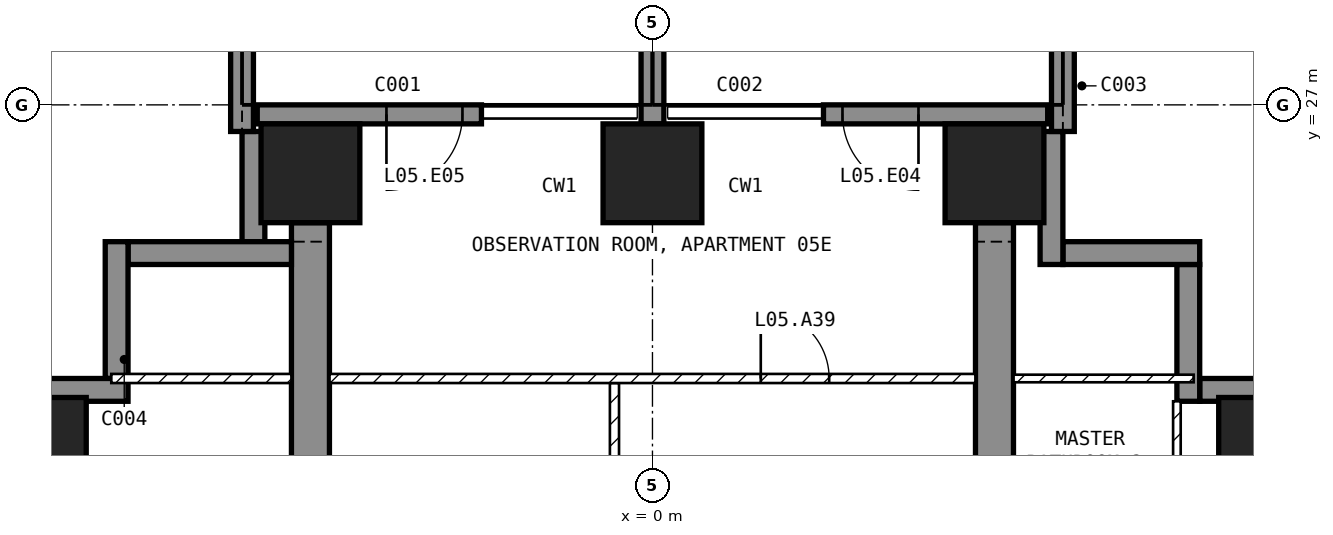
"""IFC4 building model, lengths in metres.
Left out: names, types, materials, properties, quantities, classifications, styles, units other than length and angle.
Written with IfcOpenShell. Run it as: python <this file> out.ifc"""

import sys

from ifc_helpers import new_model, si_unit, direction, frame, frame_2d, origin, origin_2d, place, context, subcontext, project, spatial, polyline, rectangle, outline, extrude, element, fill, save


model = new_model("IFC4")
c1 = context("Model", 3, precision=1e-05, world=origin(), true_north=direction((0.0, 1.0)))
c2 = subcontext(c1, "Body", "Model", "MODEL_VIEW")
j1 = project(units=[si_unit("LENGTHUNIT", "METRE"), si_unit("PLANEANGLEUNIT", "RADIAN")], contexts=[c1])
p1 = place(None, origin())
s1 = spatial("IfcSite", under=j1, at=p1, CompositionType="ELEMENT")
p2 = place(p1, origin())
s2 = spatial("IfcBuilding", under=s1, at=p2, CompositionType="ELEMENT")
p3 = place(p2, frame((0.0, 0.0, 36.5)))
s3 = spatial("IfcBuildingStorey", under=s2, at=p3, CompositionType="ELEMENT", Elevation=36.5)
for number, where, z_axis, x_axis in (
    (1, (-8.1, 22.5, -0.25), (0.0, 0.0, 1.0), (1.0, 0.0, 0.0)),
    (2, (-4.5, 26.1, -0.25), (0.0, 0.0, 1.0), (1.0, 0.0, 0.0)),
    (3, (0.0, 26.1, -0.25), (0.0, 0.0, 1.0), (1.0, 0.0, 0.0)),
    (4, (4.5, 26.1, -0.25), (0.0, 0.0, 1.0), (1.0, 0.0, 0.0)),
    (5, (8.1, 22.5, -0.25), (0.0, 0.0, 1.0), (1.0, 0.0, 0.0)),
):
    element("IfcColumn", number, at=place(p3, frame(where, z_axis=z_axis, x_axis=x_axis)), inside=s3, PredefinedType="COLUMN", context=c2, shape_type="SweptSolid", body=[
        extrude(rectangle(XDim=1.3, YDim=1.3, at=origin_2d()), origin(), (0.0, 0.0, 1.0), 3.5),
    ])
for number, where, z_axis, x_axis in (
    (6, (-4.75, 9.0, -0.25), (1.0, 0.0, 0.0), (0.0, 1.0, 0.0)),
    (7, (4.25, 9.0, -0.25), (1.0, 0.0, 0.0), (0.0, 1.0, 0.0)),
):
    element("IfcWall", number, at=place(p3, frame(where, z_axis=z_axis, x_axis=x_axis)), inside=s3, PredefinedType="SHEAR", context=c2, shape_type="SweptSolid", body=[
        extrude(outline(polyline([(0.0, 0.0), (2.1, 0.0), (2.1, 2.65), (4.5, 2.65), (4.5, 0.0), (9.9, 0.0), (9.9, 2.65), (12.3, 2.65), (12.3, 0.0), (16.45, 0.0), (16.45, 3.5), (0.0, 3.5), (0.0, 0.0)])), origin(), (0.0, 0.0, 1.0), 0.5),
    ])
p4 = place(p3, frame((5.2, 26.875, 0.0), z_axis=(0.0, 0.0, 1.0), x_axis=(-1.0, 0.0, 0.0)))
e8 = element("IfcWall", 8, at=p4, inside=s3, PredefinedType="SOLIDWALL", context=c2, shape_type="SweptSolid", body=[
    extrude(rectangle(XDim=2.95, YDim=0.25, at=frame_2d((1.475, 0.0))), origin(), (0.0, 0.0, 1.0), 3.25),
])
p5 = place(p4, frame((1.7, 0.0, 0.0)))
e9 = element("IfcOpeningElement", 9, at=p5, cuts=e8, PredefinedType="OPENING", context=c2, shape_type="SweptSolid", body=[
    extrude(rectangle(XDim=1.0, YDim=2.4, at=frame_2d((0.5, 1.2))), frame((0.0, 0.135, 0.0), z_axis=(0.0, -1.0, 0.0), x_axis=(1.0, 0.0, 0.0)), (0.0, 0.0, 1.0), 0.27),
])
p6 = place(p3, frame((-2.25, 26.875, 0.0), z_axis=(0.0, 0.0, 1.0), x_axis=(-1.0, 0.0, 0.0)))
e10 = element("IfcWall", 10, at=p6, inside=s3, PredefinedType="SOLIDWALL", context=c2, shape_type="SweptSolid", body=[
    extrude(rectangle(XDim=2.95, YDim=0.25, at=frame_2d((1.475, 0.0))), origin(), (0.0, 0.0, 1.0), 3.25),
])
p7 = place(p6, frame((0.25, 0.0, 0.0)))
e11 = element("IfcOpeningElement", 11, at=p7, cuts=e10, PredefinedType="OPENING", context=c2, shape_type="SweptSolid", body=[
    extrude(rectangle(XDim=1.0, YDim=2.4, at=frame_2d((0.5, 1.2))), frame((0.0, 0.135, 0.0), z_axis=(0.0, -1.0, 0.0), x_axis=(1.0, 0.0, 0.0)), (0.0, 0.0, 1.0), 0.27),
])
p8 = place(p3, frame((8.65, 23.25, 0.0), z_axis=(0.0, 0.0, 1.0), x_axis=(-1.0, 0.0, 0.0)))
e12 = element("IfcWall", 12, at=p8, inside=s3, PredefinedType="SOLIDWALL", context=c2, shape_type="SweptSolid", body=[
    extrude(rectangle(XDim=1.45, YDim=0.3, at=frame_2d((0.725, 0.0))), origin(), (0.0, 0.0, 1.0), 3.25),
])
p9 = place(p3, frame((7.05, 23.1, 0.0), z_axis=(0.0, 0.0, 1.0), x_axis=(0.0, 1.0, 0.0)))
e13 = element("IfcWall", 13, at=p9, inside=s3, PredefinedType="SOLIDWALL", context=c2, shape_type="SweptSolid", body=[
    extrude(rectangle(XDim=1.8, YDim=0.3, at=frame_2d((0.9, 0.0))), origin(), (0.0, 0.0, 1.0), 3.25),
])
p10 = place(p3, frame((7.2, 25.05, 0.0), z_axis=(0.0, 0.0, 1.0), x_axis=(-1.0, 0.0, 0.0)))
e14 = element("IfcWall", 14, at=p10, inside=s3, PredefinedType="SOLIDWALL", context=c2, shape_type="SweptSolid", body=[
    extrude(rectangle(XDim=1.8, YDim=0.3, at=frame_2d((0.9, 0.0))), origin(), (0.0, 0.0, 1.0), 3.25),
])
p11 = place(p3, frame((5.25, 24.9, 0.0), z_axis=(0.0, 0.0, 1.0), x_axis=(0.0, 1.0, 0.0)))
e15 = element("IfcWall", 15, at=p11, inside=s3, PredefinedType="SOLIDWALL", context=c2, shape_type="SweptSolid", body=[
    extrude(rectangle(XDim=1.75, YDim=0.3, at=frame_2d((0.875, 0.0))), origin(), (0.0, 0.0, 1.0), 3.25),
])
p12 = place(p3, frame((-5.25, 26.65, 0.0), z_axis=(0.0, 0.0, 1.0), x_axis=(0.0, -1.0, 0.0)))
e16 = element("IfcWall", 16, at=p12, inside=s3, PredefinedType="SOLIDWALL", context=c2, shape_type="SweptSolid", body=[
    extrude(rectangle(XDim=1.45, YDim=0.3, at=frame_2d((0.725, 0.0))), origin(), (0.0, 0.0, 1.0), 3.25),
])
p13 = place(p3, frame((-4.75, 25.05, 0.0), z_axis=(0.0, 0.0, 1.0), x_axis=(-1.0, 0.0, 0.0)))
e17 = element("IfcWall", 17, at=p13, inside=s3, PredefinedType="SOLIDWALL", context=c2, shape_type="SweptSolid", body=[
    extrude(rectangle(XDim=2.15, YDim=0.3, at=frame_2d((1.075, 0.0))), origin(), (0.0, 0.0, 1.0), 3.25),
])
p14 = place(p3, frame((-7.05, 25.2, 0.0), z_axis=(0.0, 0.0, 1.0), x_axis=(0.0, -1.0, 0.0)))
e18 = element("IfcWall", 18, at=p14, inside=s3, PredefinedType="SOLIDWALL", context=c2, shape_type="SweptSolid", body=[
    extrude(rectangle(XDim=1.8, YDim=0.3, at=frame_2d((0.9, 0.0))), origin(), (0.0, 0.0, 1.0), 3.25),
])
p15 = place(p3, frame((-6.9, 23.25, 0.0), z_axis=(0.0, 0.0, 1.0), x_axis=(-1.0, 0.0, 0.0)))
e19 = element("IfcWall", 19, at=p15, inside=s3, PredefinedType="SOLIDWALL", context=c2, shape_type="SweptSolid", body=[
    extrude(rectangle(XDim=1.75, YDim=0.3, at=frame_2d((0.875, 0.0))), origin(), (0.0, 0.0, 1.0), 3.25),
])
p16 = place(p3, frame((-5.4, 26.65, 0.0), z_axis=(0.0, 0.0, 1.0), x_axis=(0.0, 1.0, 0.0)))
e20 = element("IfcWall", 20, at=p16, inside=s3, PredefinedType="SOLIDWALL", context=c2, shape_type="SweptSolid", body=[
    extrude(rectangle(XDim=3.05, YDim=0.3, at=frame_2d((1.525, 0.0))), origin(), (0.0, 0.0, 1.0), 3.25),
])
p17 = place(p3, frame((0.0, 26.75, 0.0), z_axis=(0.0, 0.0, 1.0), x_axis=(0.0, 1.0, 0.0)))
e21 = element("IfcWall", 21, at=p17, inside=s3, PredefinedType="SOLIDWALL", context=c2, shape_type="SweptSolid", body=[
    extrude(rectangle(XDim=2.95, YDim=0.3, at=frame_2d((1.475, 0.0))), origin(), (0.0, 0.0, 1.0), 3.25),
])
p18 = place(p3, frame((5.4, 26.65, 0.0), z_axis=(0.0, 0.0, 1.0), x_axis=(0.0, 1.0, 0.0)))
e22 = element("IfcWall", 22, at=p18, inside=s3, PredefinedType="SOLIDWALL", context=c2, shape_type="SweptSolid", body=[
    extrude(rectangle(XDim=3.05, YDim=0.3, at=frame_2d((1.525, 0.0))), origin(), (0.0, 0.0, 1.0), 3.25),
])
p19 = place(p3, frame((-0.5, 18.96, 0.0), z_axis=(0.0, 0.0, 1.0), x_axis=(0.0, 1.0, 0.0)))
e23 = element("IfcWall", 23, at=p19, inside=s3, PredefinedType="PARTITIONING", context=c2, shape_type="SweptSolid", body=[
    extrude(rectangle(XDim=4.38, YDim=0.12, at=frame_2d((2.19, 0.0))), origin(), (0.0, 0.0, 1.0), 3.25),
])
p20 = place(p19, frame((1.74, 0.0, 0.0)))
e24 = element("IfcOpeningElement", 24, at=p20, cuts=e23, PredefinedType="OPENING", context=c2, shape_type="SweptSolid", body=[
    extrude(rectangle(XDim=0.9, YDim=2.1, at=frame_2d((0.45, 1.05))), frame((0.0, 0.07, 0.0), z_axis=(0.0, -1.0, 0.0), x_axis=(1.0, 0.0, 0.0)), (0.0, 0.0, 1.0), 0.14),
])
p21 = place(p3, frame((-4.25, 23.4, 0.0), z_axis=(0.0, 0.0, 1.0), x_axis=(1.0, 0.0, 0.0)))
e25 = element("IfcWall", 25, at=p21, inside=s3, PredefinedType="PARTITIONING", context=c2, shape_type="SweptSolid", body=[
    extrude(rectangle(XDim=8.5, YDim=0.12, at=frame_2d((4.25, 0.0))), origin(), (0.0, 0.0, 1.0), 3.25),
])
p22 = place(p21, frame((5.675, 0.0, 0.0)))
e26 = element("IfcOpeningElement", 26, at=p22, cuts=e25, PredefinedType="OPENING", context=c2, shape_type="SweptSolid", body=[
    extrude(rectangle(XDim=0.9, YDim=2.1, at=frame_2d((0.45, 1.05))), frame((0.0, 0.07, 0.0), z_axis=(0.0, -1.0, 0.0), x_axis=(1.0, 0.0, 0.0)), (0.0, 0.0, 1.0), 0.14),
])
p23 = place(p3, frame((6.9, 20.45, 0.0), z_axis=(0.0, 0.0, 1.0), x_axis=(0.0, 1.0, 0.0)))
e27 = element("IfcWall", 27, at=p23, inside=s3, PredefinedType="PARTITIONING", context=c2, shape_type="SweptSolid", body=[
    extrude(rectangle(XDim=2.65, YDim=0.1, at=frame_2d((1.325, 0.0))), origin(), (0.0, 0.0, 1.0), 3.25),
])
p24 = place(p3, frame((4.75, 23.4, 0.0), z_axis=(0.0, 0.0, 1.0), x_axis=(1.0, 0.0, 0.0)))
e28 = element("IfcWall", 28, at=p24, inside=s3, PredefinedType="PARTITIONING", context=c2, shape_type="SweptSolid", body=[
    extrude(rectangle(XDim=2.37, YDim=0.1, at=frame_2d((1.185, 0.0))), origin(), (0.0, 0.0, 1.0), 3.25),
])
p25 = place(p3, frame((-7.12, 23.4, 0.0), z_axis=(0.0, 0.0, 1.0), x_axis=(1.0, 0.0, 0.0)))
e29 = element("IfcWall", 29, at=p25, inside=s3, PredefinedType="PARTITIONING", context=c2, shape_type="SweptSolid", body=[
    extrude(rectangle(XDim=2.37, YDim=0.12, at=frame_2d((1.185, 0.0))), origin(), (0.0, 0.0, 1.0), 3.25),
])
p26 = place(p5, origin())
e30 = element("IfcDoor", 30, at=p26, inside=s3, OperationType="SINGLE_SWING_LEFT", PredefinedType="DOOR", context=c2, shape_type="SweptSolid", body=[
    extrude(rectangle(XDim=1.0, YDim=2.4, at=frame_2d((0.5, 1.2))), frame((0.0, 0.025, 0.0), z_axis=(0.0, -1.0, 0.0), x_axis=(1.0, 0.0, 0.0)), (0.0, 0.0, 1.0), 0.05),
])
fill(e9, e30)
p27 = place(p7, origin())
e31 = element("IfcDoor", 31, at=p27, inside=s3, OperationType="SINGLE_SWING_RIGHT", PredefinedType="DOOR", context=c2, shape_type="SweptSolid", body=[
    extrude(rectangle(XDim=1.0, YDim=2.4, at=frame_2d((0.5, 1.2))), frame((0.0, 0.025, 0.0), z_axis=(0.0, -1.0, 0.0), x_axis=(1.0, 0.0, 0.0)), (0.0, 0.0, 1.0), 0.05),
])
fill(e11, e31)
p28 = place(p22, origin())
e32 = element("IfcDoor", 32, at=p28, inside=s3, OperationType="SINGLE_SWING_LEFT", PredefinedType="DOOR", context=c2, shape_type="SweptSolid", body=[
    extrude(rectangle(XDim=0.9, YDim=2.1, at=frame_2d((0.45, 1.05))), frame((0.0, 0.025, 0.0), z_axis=(0.0, -1.0, 0.0), x_axis=(1.0, 0.0, 0.0)), (0.0, 0.0, 1.0), 0.05),
])
fill(e26, e32)
save(model, sys.argv[1])
